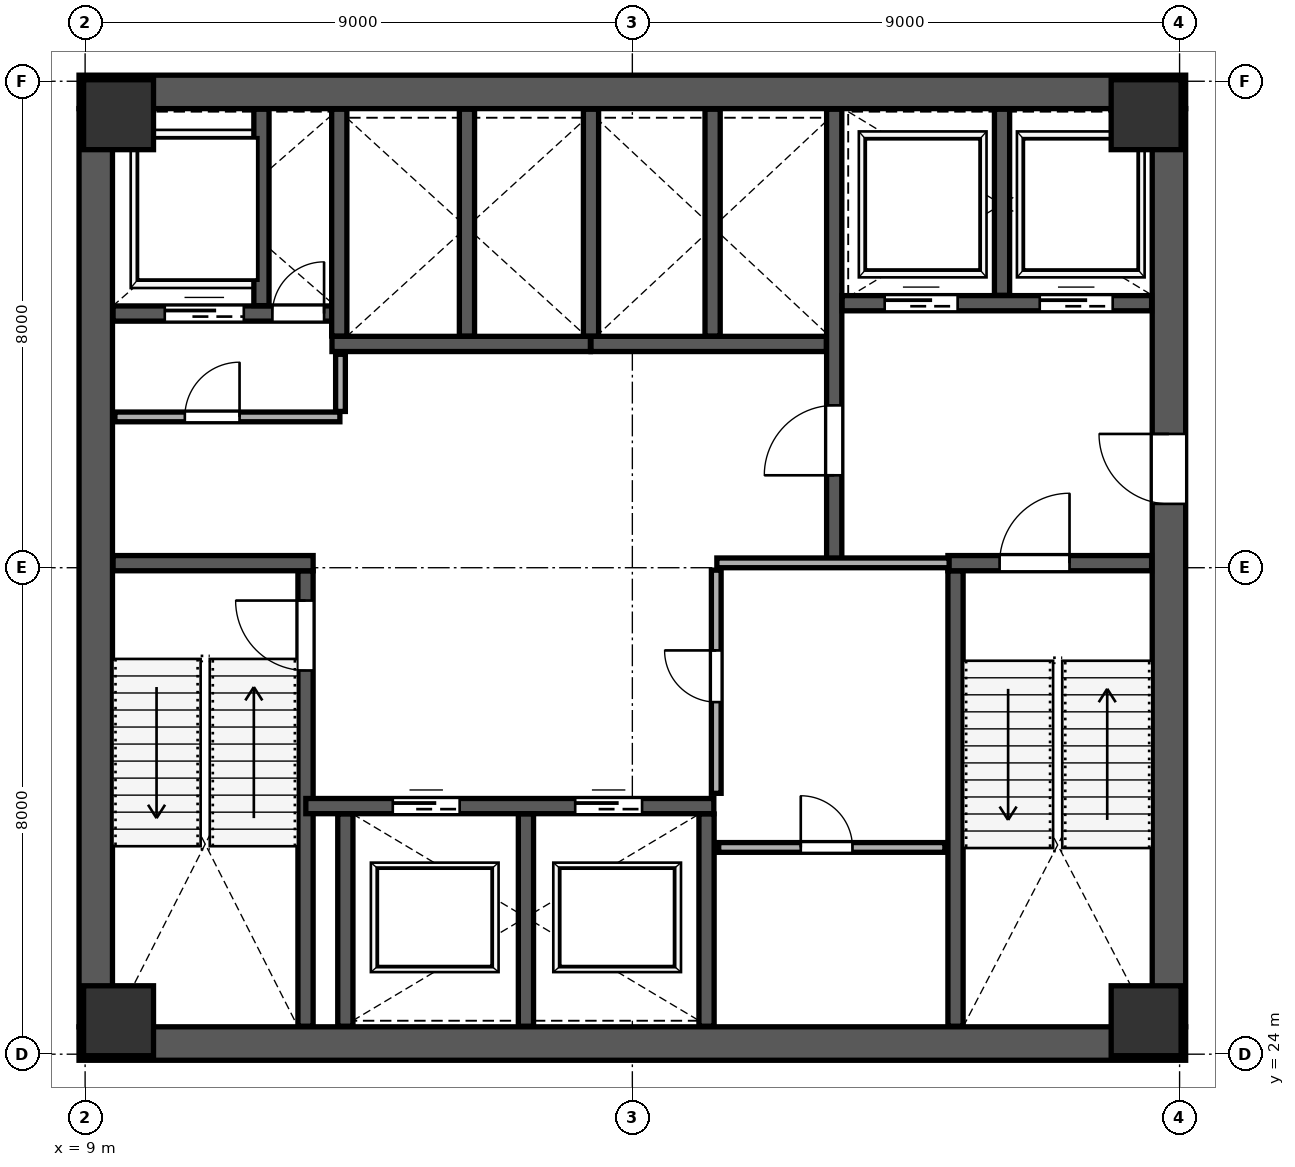
"""IFC4 building model, lengths in metres.
Left out: names, types, materials, properties, quantities, classifications, styles, units other than length and angle.
Written with IfcOpenShell. Run it as: python <this file> out.ifc"""

import sys

from ifc_helpers import new_model, si_unit, direction, frame, frame_2d, origin, origin_2d, place, context, subcontext, project, spatial, rectangle, extrude, source, transform, mapped, element, fill, save


model = new_model("IFC4")
c1 = context("Model", 3, precision=1e-05, world=origin(), true_north=direction((0.0, 1.0)))
c2 = subcontext(c1, "Body", "Model", "MODEL_VIEW")
j1 = project(units=[si_unit("LENGTHUNIT", "METRE"), si_unit("PLANEANGLEUNIT", "RADIAN")], contexts=[c1])
p1 = place(None, origin())
s1 = spatial("IfcSite", under=j1, at=p1, CompositionType="ELEMENT")
p2 = place(p1, origin())
s2 = spatial("IfcBuilding", under=s1, at=p2, CompositionType="ELEMENT")
p3 = place(p2, frame((0.0, 0.0, 74.8)))
s3 = spatial("IfcBuildingStorey", under=s2, at=p3, CompositionType="ELEMENT", Elevation=74.8)
m1 = source(origin(), c2, "Body", "SweptSolid", [
    extrude(rectangle(XDim=1.15, YDim=1.15, at=origin_2d()), origin(), (0.0, 0.0, 1.0), 4.198),
])
for number, where, z_axis, x_axis in (
    (1, (9.55, 24.55, 0.001), (0.0, 0.0, 1.0), (1.0, 0.0, 0.0)),
    (2, (26.45, 24.55, 0.001), (0.0, 0.0, 1.0), (1.0, 0.0, 0.0)),
    (3, (9.55, 39.45, 0.001), (0.0, 0.0, 1.0), (1.0, 0.0, 0.0)),
    (4, (26.45, 39.45, 0.001), (0.0, 0.0, 1.0), (1.0, 0.0, 0.0)),
):
    element("IfcColumn", number, at=place(p3, frame(where, z_axis=z_axis, x_axis=x_axis)), inside=s3, PredefinedType="COLUMN", context=c2, shape_type="MappedRepresentation", body=[
        mapped(m1, transform((0.0, 0.0, 0.0), scale=1.0)),
    ])
p4 = place(p3, frame((9.175, 24.45, 0.0), z_axis=(0.0, 0.0, 1.0), x_axis=(0.0, 1.0, 0.0)))
e5 = element("IfcWall", 5, at=p4, inside=s3, PredefinedType="SHEAR", context=c2, shape_type="SweptSolid", body=[
    extrude(rectangle(XDim=15.1, YDim=0.55, at=frame_2d((7.55, 0.0))), origin(), (0.0, 0.0, 1.0), 3.96),
])
p5 = place(p3, frame((26.825, 24.45, 0.0), z_axis=(0.0, 0.0, 1.0), x_axis=(0.0, 1.0, 0.0)))
e6 = element("IfcWall", 6, at=p5, inside=s3, PredefinedType="SHEAR", context=c2, shape_type="SweptSolid", body=[
    extrude(rectangle(XDim=15.1, YDim=0.55, at=frame_2d((7.55, 0.0))), origin(), (0.0, 0.0, 1.0), 3.96),
])
p6 = place(p5, frame((8.6, 0.0, 0.0)))
e7 = element("IfcOpeningElement", 7, at=p6, cuts=e6, PredefinedType="OPENING", context=c2, shape_type="SweptSolid", body=[
    extrude(rectangle(XDim=1.15, YDim=2.2, at=frame_2d((0.575, 1.1))), frame((0.0, 0.285, 0.0), z_axis=(0.0, -1.0, 0.0), x_axis=(1.0, 0.0, 0.0)), (0.0, 0.0, 1.0), 0.57),
])
for number, where, z_axis, x_axis in (
    (8, (8.9, 24.175, 0.0), (0.0, 0.0, 1.0), (1.0, 0.0, 0.0)),
    (9, (8.9, 39.825, 0.0), (0.0, 0.0, 1.0), (1.0, 0.0, 0.0)),
):
    element("IfcWall", number, at=place(p3, frame(where, z_axis=z_axis, x_axis=x_axis)), inside=s3, PredefinedType="SHEAR", context=c2, shape_type="SweptSolid", body=[
        extrude(rectangle(XDim=18.2, YDim=0.55, at=frame_2d((9.1, 0.0))), origin(), (0.0, 0.0, 1.0), 3.96),
    ])
p7 = place(p3, frame((12.625, 24.46, 0.0), z_axis=(0.0, 0.0, 1.0), x_axis=(0.0, 1.0, 0.0)))
e10 = element("IfcWall", 10, at=p7, inside=s3, PredefinedType="SHEAR", context=c2, shape_type="SweptSolid", body=[
    extrude(rectangle(XDim=7.49, YDim=0.25, at=frame_2d((3.745, 0.0))), origin(), (0.0, 0.0, 1.0), 3.96),
])
p8 = place(p7, frame((5.85, 0.0, 0.0)))
e11 = element("IfcOpeningElement", 11, at=p8, cuts=e10, PredefinedType="OPENING", context=c2, shape_type="SweptSolid", body=[
    extrude(rectangle(XDim=1.15, YDim=2.2, at=frame_2d((0.575, 1.1))), frame((0.0, 0.135, 0.0), z_axis=(0.0, -1.0, 0.0), x_axis=(1.0, 0.0, 0.0)), (0.0, 0.0, 1.0), 0.27),
])
p9 = place(p3, frame((9.46, 32.075, 0.0), z_axis=(0.0, 0.0, 1.0), x_axis=(1.0, 0.0, 0.0)))
e12 = element("IfcWall", 12, at=p9, inside=s3, PredefinedType="SHEAR", context=c2, shape_type="SweptSolid", body=[
    extrude(rectangle(XDim=3.29, YDim=0.25, at=frame_2d((1.645, 0.0))), origin(), (0.0, 0.0, 1.0), 3.96),
])
p10 = place(p3, frame((23.315, 24.46, 0.0), z_axis=(0.0, 0.0, 1.0), x_axis=(0.0, 1.0, 0.0)))
e13 = element("IfcWall", 13, at=p10, inside=s3, PredefinedType="SHEAR", context=c2, shape_type="SweptSolid", body=[
    extrude(rectangle(XDim=7.49, YDim=0.25, at=frame_2d((3.745, 0.0))), origin(), (0.0, 0.0, 1.0), 3.96),
])
p11 = place(p3, frame((23.19, 32.075, 0.0), z_axis=(0.0, 0.0, 1.0), x_axis=(1.0, 0.0, 0.0)))
e14 = element("IfcWall", 14, at=p11, inside=s3, PredefinedType="SHEAR", context=c2, shape_type="SweptSolid", body=[
    extrude(rectangle(XDim=3.35, YDim=0.25, at=frame_2d((1.675, 0.0))), origin(), (0.0, 0.0, 1.0), 3.96),
])
p12 = place(p11, frame((0.85, 0.0, 0.0)))
e15 = element("IfcOpeningElement", 15, at=p12, cuts=e14, PredefinedType="OPENING", context=c2, shape_type="SweptSolid", body=[
    extrude(rectangle(XDim=1.15, YDim=2.2, at=frame_2d((0.575, 1.1))), frame((0.0, 0.135, 0.0), z_axis=(0.0, -1.0, 0.0), x_axis=(1.0, 0.0, 0.0)), (0.0, 0.0, 1.0), 0.27),
])
p13 = place(p3, frame((21.32, 32.12, 0.0), z_axis=(0.0, 0.0, 1.0), x_axis=(0.0, 1.0, 0.0)))
e16 = element("IfcWall", 16, at=p13, inside=s3, PredefinedType="SHEAR", context=c2, shape_type="SweptSolid", body=[
    extrude(rectangle(XDim=7.42, YDim=0.25, at=frame_2d((3.71, 0.0))), origin(), (0.0, 0.0, 1.0), 3.96),
])
p14 = place(p13, frame((1.4, 0.0, 0.0)))
e17 = element("IfcOpeningElement", 17, at=p14, cuts=e16, PredefinedType="OPENING", context=c2, shape_type="SweptSolid", body=[
    extrude(rectangle(XDim=1.15, YDim=2.2, at=frame_2d((0.575, 1.1))), frame((0.0, 0.135, 0.0), z_axis=(0.0, -1.0, 0.0), x_axis=(1.0, 0.0, 0.0)), (0.0, 0.0, 1.0), 0.27),
])
p15 = place(p3, frame((9.46, 36.18, 0.0), z_axis=(0.0, 0.0, 1.0), x_axis=(1.0, 0.0, 0.0)))
e18 = element("IfcWall", 18, at=p15, inside=s3, PredefinedType="SHEAR", context=c2, shape_type="SweptSolid", body=[
    extrude(rectangle(XDim=3.79, YDim=0.25, at=frame_2d((1.895, 0.0))), origin(), (0.0, 0.0, 1.0), 3.96),
])
p16 = place(p15, frame((2.62, 0.0, 0.0)))
e19 = element("IfcOpeningElement", 19, at=p16, cuts=e18, PredefinedType="OPENING", context=c2, shape_type="SweptSolid", body=[
    extrude(rectangle(XDim=0.85, YDim=2.1, at=frame_2d((0.425, 1.05))), frame((0.0, 0.135, 0.0), z_axis=(0.0, -1.0, 0.0), x_axis=(1.0, 0.0, 0.0)), (0.0, 0.0, 1.0), 0.27),
])
p17 = place(p15, frame((0.85, 0.0, 0.0)))
e20 = element("IfcOpeningElement", 20, at=p17, cuts=e18, PredefinedType="OPENING", context=c2, shape_type="SweptSolid", body=[
    extrude(rectangle(XDim=1.3, YDim=2.25, at=frame_2d((0.65, 1.125))), frame((0.0, 0.135, 0.0), z_axis=(0.0, -1.0, 0.0), x_axis=(1.0, 0.0, 0.0)), (0.0, 0.0, 1.0), 0.27),
])
p18 = place(p3, frame((11.9, 36.31, 0.0), z_axis=(0.0, 0.0, 1.0), x_axis=(0.0, 1.0, 0.0)))
e21 = element("IfcWall", 21, at=p18, inside=s3, PredefinedType="SHEAR", context=c2, shape_type="SweptSolid", body=[
    extrude(rectangle(XDim=3.23, YDim=0.25, at=frame_2d((1.615, 0.0))), origin(), (0.0, 0.0, 1.0), 3.96),
])
p19 = place(p3, frame((21.45, 36.35, 0.0), z_axis=(0.0, 0.0, 1.0), x_axis=(1.0, 0.0, 0.0)))
e22 = element("IfcWall", 22, at=p19, inside=s3, PredefinedType="SHEAR", context=c2, shape_type="SweptSolid", body=[
    extrude(rectangle(XDim=5.09, YDim=0.25, at=frame_2d((2.545, 0.0))), origin(), (0.0, 0.0, 1.0), 3.96),
])
p20 = place(p19, frame((0.7, 0.0, 0.0)))
e23 = element("IfcOpeningElement", 23, at=p20, cuts=e22, PredefinedType="OPENING", context=c2, shape_type="SweptSolid", body=[
    extrude(rectangle(XDim=1.2, YDim=2.2, at=frame_2d((0.6, 1.1))), frame((0.0, 0.135, 0.0), z_axis=(0.0, -1.0, 0.0), x_axis=(1.0, 0.0, 0.0)), (0.0, 0.0, 1.0), 0.27),
])
p21 = place(p19, frame((3.25, 0.0, 0.0)))
e24 = element("IfcOpeningElement", 24, at=p21, cuts=e22, PredefinedType="OPENING", context=c2, shape_type="SweptSolid", body=[
    extrude(rectangle(XDim=1.2, YDim=2.2, at=frame_2d((0.6, 1.1))), frame((0.0, 0.135, 0.0), z_axis=(0.0, -1.0, 0.0), x_axis=(1.0, 0.0, 0.0)), (0.0, 0.0, 1.0), 0.27),
])
p22 = place(p3, frame((24.08, 36.48, 0.0), z_axis=(0.0, 0.0, 1.0), x_axis=(0.0, 1.0, 0.0)))
e25 = element("IfcWall", 25, at=p22, inside=s3, PredefinedType="SHEAR", context=c2, shape_type="SweptSolid", body=[
    extrude(rectangle(XDim=3.06, YDim=0.25, at=frame_2d((1.53, 0.0))), origin(), (0.0, 0.0, 1.0), 3.96),
])
p23 = place(p3, frame((12.63, 28.08, 0.0), z_axis=(0.0, 0.0, 1.0), x_axis=(1.0, 0.0, 0.0)))
e26 = element("IfcWall", 26, at=p23, inside=s3, PredefinedType="SHEAR", context=c2, shape_type="SweptSolid", body=[
    extrude(rectangle(XDim=6.71, YDim=0.25, at=frame_2d((3.355, 0.0))), origin(), (0.0, 0.0, 1.0), 3.96),
])
p24 = place(p23, frame((1.43, 0.0, 0.0)))
e27 = element("IfcOpeningElement", 27, at=p24, cuts=e26, PredefinedType="OPENING", context=c2, shape_type="SweptSolid", body=[
    extrude(rectangle(XDim=1.1, YDim=2.2, at=frame_2d((0.55, 1.1))), frame((0.0, 0.135, 0.0), z_axis=(0.0, -1.0, 0.0), x_axis=(1.0, 0.0, 0.0)), (0.0, 0.0, 1.0), 0.27),
])
p25 = place(p23, frame((4.43, 0.0, 0.0)))
e28 = element("IfcOpeningElement", 28, at=p25, cuts=e26, PredefinedType="OPENING", context=c2, shape_type="SweptSolid", body=[
    extrude(rectangle(XDim=1.1, YDim=2.2, at=frame_2d((0.55, 1.1))), frame((0.0, 0.135, 0.0), z_axis=(0.0, -1.0, 0.0), x_axis=(1.0, 0.0, 0.0)), (0.0, 0.0, 1.0), 0.27),
])
for number, where, z_axis, x_axis in (
    (29, (13.28, 24.46, 0.0), (0.0, 0.0, 1.0), (0.0, 1.0, 0.0)),
    (30, (16.25, 24.46, 0.0), (0.0, 0.0, 1.0), (0.0, 1.0, 0.0)),
    (31, (19.22, 24.46, 0.0), (0.0, 0.0, 1.0), (0.0, 1.0, 0.0)),
):
    element("IfcWall", number, at=place(p3, frame(where, z_axis=z_axis, x_axis=x_axis)), inside=s3, PredefinedType="SHEAR", context=c2, shape_type="SweptSolid", body=[
        extrude(rectangle(XDim=3.49, YDim=0.25, at=frame_2d((1.745, 0.0))), origin(), (0.0, 0.0, 1.0), 3.96),
    ])
p26 = place(p3, frame((13.06, 35.68, 0.0), z_axis=(0.0, 0.0, 1.0), x_axis=(1.0, 0.0, 0.0)))
e32 = element("IfcWall", 32, at=p26, inside=s3, PredefinedType="SHEAR", context=c2, shape_type="SweptSolid", body=[
    extrude(rectangle(XDim=4.25, YDim=0.25, at=frame_2d((2.125, 0.0))), origin(), (0.0, 0.0, 1.0), 3.96),
])
for number, where, z_axis, x_axis in (
    (33, (13.18, 35.81, 0.0), (0.0, 0.0, 1.0), (0.0, 1.0, 0.0)),
    (34, (15.28, 35.81, 0.0), (0.0, 0.0, 1.0), (0.0, 1.0, 0.0)),
):
    element("IfcWall", number, at=place(p3, frame(where, z_axis=z_axis, x_axis=x_axis)), inside=s3, PredefinedType="SHEAR", context=c2, shape_type="SweptSolid", body=[
        extrude(rectangle(XDim=3.73, YDim=0.25, at=frame_2d((1.865, 0.0))), origin(), (0.0, 0.0, 1.0), 3.96),
    ])
p27 = place(p3, frame((17.32, 35.68, 0.0), z_axis=(0.0, 0.0, 1.0), x_axis=(1.0, 0.0, 0.0)))
e35 = element("IfcWall", 35, at=p27, inside=s3, PredefinedType="SHEAR", context=c2, shape_type="SweptSolid", body=[
    extrude(rectangle(XDim=3.87, YDim=0.25, at=frame_2d((1.935, 0.0))), origin(), (0.0, 0.0, 1.0), 3.96),
])
for number, where, z_axis, x_axis in (
    (36, (17.32, 35.81, 0.0), (0.0, 0.0, 1.0), (0.0, 1.0, 0.0)),
    (37, (19.32, 35.81, 0.0), (0.0, 0.0, 1.0), (0.0, 1.0, 0.0)),
):
    element("IfcWall", number, at=place(p3, frame(where, z_axis=z_axis, x_axis=x_axis)), inside=s3, PredefinedType="SHEAR", context=c2, shape_type="SweptSolid", body=[
        extrude(rectangle(XDim=3.73, YDim=0.25, at=frame_2d((1.865, 0.0))), origin(), (0.0, 0.0, 1.0), 3.96),
    ])
p28 = place(p3, frame((9.49, 34.48, 0.0), z_axis=(0.0, 0.0, 1.0), x_axis=(1.0, 0.0, 0.0)))
e38 = element("IfcWall", 38, at=p28, inside=s3, PredefinedType="PARTITIONING", context=c2, shape_type="SweptSolid", body=[
    extrude(rectangle(XDim=3.7, YDim=0.16, at=frame_2d((1.85, 0.0))), origin(), (0.0, 0.0, 1.0), 3.96),
])
p29 = place(p28, frame((1.15, 0.0, 0.0)))
e39 = element("IfcOpeningElement", 39, at=p29, cuts=e38, PredefinedType="OPENING", context=c2, shape_type="SweptSolid", body=[
    extrude(rectangle(XDim=0.9, YDim=2.15, at=frame_2d((0.45, 1.075))), frame((0.0, 0.09, 0.0), z_axis=(0.0, -1.0, 0.0), x_axis=(1.0, 0.0, 0.0)), (0.0, 0.0, 1.0), 0.18),
])
p30 = place(p3, frame((13.2, 34.57, 0.0), z_axis=(0.0, 0.0, 1.0), x_axis=(0.0, 1.0, 0.0)))
e40 = element("IfcWall", 40, at=p30, inside=s3, PredefinedType="PARTITIONING", context=c2, shape_type="SweptSolid", body=[
    extrude(rectangle(XDim=0.94, YDim=0.16, at=frame_2d((0.47, 0.0))), origin(), (0.0, 0.0, 1.0), 3.96),
])
p31 = place(p3, frame((19.39, 32.08, 0.0), z_axis=(0.0, 0.0, 1.0), x_axis=(1.0, 0.0, 0.0)))
e41 = element("IfcWall", 41, at=p31, inside=s3, PredefinedType="PARTITIONING", context=c2, shape_type="SweptSolid", body=[
    extrude(rectangle(XDim=3.82, YDim=0.16, at=frame_2d((1.91, 0.0))), origin(), (0.0, 0.0, 1.0), 3.96),
])
p32 = place(p3, frame((19.38, 28.29, 0.0), z_axis=(0.0, 0.0, 1.0), x_axis=(0.0, 1.0, 0.0)))
e42 = element("IfcWall", 42, at=p32, inside=s3, PredefinedType="PARTITIONING", context=c2, shape_type="SweptSolid", body=[
    extrude(rectangle(XDim=3.67, YDim=0.16, at=frame_2d((1.835, 0.0))), origin(), (0.0, 0.0, 1.0), 3.96),
])
p33 = place(p32, frame((1.5, 0.0, 0.0)))
e43 = element("IfcOpeningElement", 43, at=p33, cuts=e42, PredefinedType="OPENING", context=c2, shape_type="SweptSolid", body=[
    extrude(rectangle(XDim=0.85, YDim=2.1, at=frame_2d((0.425, 1.05))), frame((0.0, 0.09, 0.0), z_axis=(0.0, -1.0, 0.0), x_axis=(1.0, 0.0, 0.0)), (0.0, 0.0, 1.0), 0.18),
])
p34 = place(p3, frame((19.42, 27.4, 0.0), z_axis=(0.0, 0.0, 1.0), x_axis=(1.0, 0.0, 0.0)))
e44 = element("IfcWall", 44, at=p34, inside=s3, PredefinedType="PARTITIONING", context=c2, shape_type="SweptSolid", body=[
    extrude(rectangle(XDim=3.72, YDim=0.16, at=frame_2d((1.86, 0.0))), origin(), (0.0, 0.0, 1.0), 3.96),
])
p35 = place(p34, frame((1.35, 0.0, 0.0)))
e45 = element("IfcOpeningElement", 45, at=p35, cuts=e44, PredefinedType="OPENING", context=c2, shape_type="SweptSolid", body=[
    extrude(rectangle(XDim=0.85, YDim=2.1, at=frame_2d((0.425, 1.05))), frame((0.0, 0.09, 0.0), z_axis=(0.0, -1.0, 0.0), x_axis=(1.0, 0.0, 0.0)), (0.0, 0.0, 1.0), 0.18),
])
p36 = place(p3, frame((27.067, 12.72, 0.0), z_axis=(0.0, 0.0, 1.0), x_axis=(0.173654514703, 0.984806635601, 0.0)))
e46 = element("IfcWall", 46, at=p36, inside=s3, PredefinedType="PARTITIONING", context=c2, shape_type="SweptSolid", body=[
    extrude(rectangle(XDim=21.08, YDim=0.16, at=frame_2d((10.54, 0.0))), origin(), (0.0, 0.0, 1.0), 3.96),
])
m2 = source(origin(), c2, "Body", "SweptSolid", [
    extrude(rectangle(XDim=1.15, YDim=2.2, at=frame_2d((0.575, 1.1))), frame((0.0, 0.025, 0.0), z_axis=(0.0, -1.0, 0.0), x_axis=(1.0, 0.0, 0.0)), (0.0, 0.0, 1.0), 0.05),
])
p37 = place(p8, origin())
e47 = element("IfcDoor", 47, at=p37, inside=s3, OperationType="SINGLE_SWING_RIGHT", PredefinedType="DOOR", context=c2, shape_type="MappedRepresentation", body=[
    mapped(m2, transform((0.0, 0.0, 0.0), scale=1.0)),
])
fill(e11, e47)
m3 = source(origin(), c2, "Body", "SweptSolid", [
    extrude(rectangle(XDim=1.15, YDim=2.2, at=frame_2d((0.575, 1.1))), frame((0.0, 0.025, 0.0), z_axis=(0.0, -1.0, 0.0), x_axis=(1.0, 0.0, 0.0)), (0.0, 0.0, 1.0), 0.05),
])
p38 = place(p14, origin())
e48 = element("IfcDoor", 48, at=p38, inside=s3, OperationType="SINGLE_SWING_LEFT", PredefinedType="DOOR", context=c2, shape_type="MappedRepresentation", body=[
    mapped(m3, transform((0.0, 0.0, 0.0), scale=1.0)),
])
fill(e17, e48)
p39 = place(p12, origin())
e49 = element("IfcDoor", 49, at=p39, inside=s3, OperationType="SINGLE_SWING_RIGHT", PredefinedType="DOOR", context=c2, shape_type="MappedRepresentation", body=[
    mapped(m2, transform((0.0, 0.0, 0.0), scale=1.0)),
])
fill(e15, e49)
p40 = place(p6, origin())
e50 = element("IfcDoor", 50, at=p40, inside=s3, OperationType="SINGLE_SWING_RIGHT", PredefinedType="DOOR", context=c2, shape_type="MappedRepresentation", body=[
    mapped(m3, transform((0.0, 0.0, 0.0), scale=1.0)),
])
fill(e7, e50)
m4 = source(origin(), c2, "Body", "SweptSolid", [
    extrude(rectangle(XDim=0.85, YDim=2.1, at=frame_2d((0.425, 1.05))), frame((0.0, 0.025, 0.0), z_axis=(0.0, -1.0, 0.0), x_axis=(1.0, 0.0, 0.0)), (0.0, 0.0, 1.0), 0.05),
])
p41 = place(p16, origin())
e51 = element("IfcDoor", 51, at=p41, inside=s3, OperationType="SINGLE_SWING_RIGHT", PredefinedType="DOOR", context=c2, shape_type="MappedRepresentation", body=[
    mapped(m4, transform((0.0, 0.0, 0.0), scale=1.0)),
])
fill(e19, e51)
m5 = source(origin(), c2, "Body", "SweptSolid", [
    extrude(rectangle(XDim=1.1, YDim=2.2, at=frame_2d((0.55, 1.1))), frame((0.0, 0.025, 0.0), z_axis=(0.0, -1.0, 0.0), x_axis=(1.0, 0.0, 0.0)), (0.0, 0.0, 1.0), 0.05),
])
p42 = place(p24, origin())
e52 = element("IfcDoor", 52, at=p42, inside=s3, OperationType="SLIDING_TO_LEFT", PredefinedType="DOOR", context=c2, shape_type="MappedRepresentation", body=[
    mapped(m5, transform((0.0, 0.0, 0.0), scale=1.0)),
])
fill(e27, e52)
p43 = place(p25, origin())
e53 = element("IfcDoor", 53, at=p43, inside=s3, OperationType="SLIDING_TO_RIGHT", PredefinedType="DOOR", context=c2, shape_type="MappedRepresentation", body=[
    mapped(m5, transform((0.0, 0.0, 0.0), scale=1.0)),
])
fill(e28, e53)
m6 = source(origin(), c2, "Body", "SweptSolid", [
    extrude(rectangle(XDim=1.2, YDim=2.2, at=frame_2d((0.6, 1.1))), frame((0.0, 0.025, 0.0), z_axis=(0.0, -1.0, 0.0), x_axis=(1.0, 0.0, 0.0)), (0.0, 0.0, 1.0), 0.05),
])
p44 = place(p20, origin())
e54 = element("IfcDoor", 54, at=p44, inside=s3, OperationType="SLIDING_TO_LEFT", PredefinedType="DOOR", context=c2, shape_type="MappedRepresentation", body=[
    mapped(m6, transform((0.0, 0.0, 0.0), scale=1.0)),
])
fill(e23, e54)
p45 = place(p21, origin())
e55 = element("IfcDoor", 55, at=p45, inside=s3, OperationType="SLIDING_TO_RIGHT", PredefinedType="DOOR", context=c2, shape_type="MappedRepresentation", body=[
    mapped(m6, transform((0.0, 0.0, 0.0), scale=1.0)),
])
fill(e24, e55)
m7 = source(origin(), c2, "Body", "SweptSolid", [
    extrude(rectangle(XDim=1.3, YDim=2.25, at=frame_2d((0.65, 1.125))), frame((0.0, 0.025, 0.0), z_axis=(0.0, -1.0, 0.0), x_axis=(1.0, 0.0, 0.0)), (0.0, 0.0, 1.0), 0.05),
])
p46 = place(p17, origin())
e56 = element("IfcDoor", 56, at=p46, inside=s3, OperationType="SLIDING_TO_LEFT", PredefinedType="DOOR", context=c2, shape_type="MappedRepresentation", body=[
    mapped(m7, transform((0.0, 0.0, 0.0), scale=1.0)),
])
fill(e20, e56)
m8 = source(origin(), c2, "Body", "SweptSolid", [
    extrude(rectangle(XDim=0.9, YDim=2.15, at=frame_2d((0.45, 1.075))), frame((0.0, 0.025, 0.0), z_axis=(0.0, -1.0, 0.0), x_axis=(1.0, 0.0, 0.0)), (0.0, 0.0, 1.0), 0.05),
])
p47 = place(p29, origin())
e57 = element("IfcDoor", 57, at=p47, inside=s3, OperationType="SINGLE_SWING_RIGHT", PredefinedType="DOOR", context=c2, shape_type="MappedRepresentation", body=[
    mapped(m8, transform((0.0, 0.0, 0.0), scale=1.0)),
])
fill(e39, e57)
p48 = place(p35, origin())
e58 = element("IfcDoor", 58, at=p48, inside=s3, OperationType="SINGLE_SWING_LEFT", PredefinedType="DOOR", context=c2, shape_type="MappedRepresentation", body=[
    mapped(m4, transform((0.0, 0.0, 0.0), scale=1.0)),
])
fill(e45, e58)
p49 = place(p33, origin())
e59 = element("IfcDoor", 59, at=p49, inside=s3, OperationType="SINGLE_SWING_RIGHT", PredefinedType="DOOR", context=c2, shape_type="MappedRepresentation", body=[
    mapped(m4, transform((0.0, 0.0, 0.0), scale=1.0)),
])
fill(e43, e59)
save(model, sys.argv[1])
